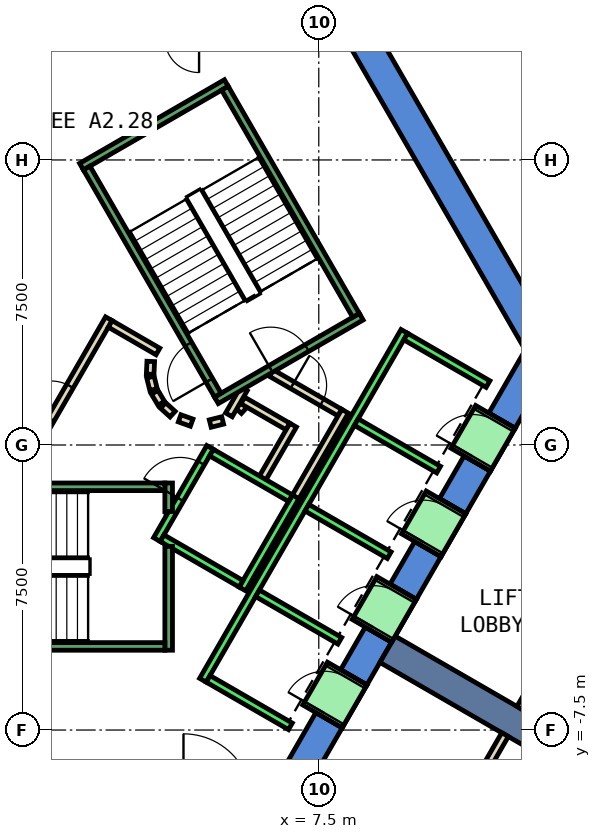
"""IFC4 building model, lengths in metres.
Left out: names, types, materials, properties, quantities, classifications, styles, units other than length and angle.
Written with IfcOpenShell. Run it as: python <this file> out.ifc"""

import sys

from ifc_helpers import new_model, si_unit, direction, frame, frame_2d, origin, place, context, subcontext, project, spatial, polyline, rectangle, outline, extrude, element, fill, save


model = new_model("IFC4")
c1 = context("Model", 3, precision=1e-05, world=origin(), true_north=direction((0.0, 1.0)))
c2 = subcontext(c1, "Body", "Model", "MODEL_VIEW")
j1 = project(units=[si_unit("LENGTHUNIT", "METRE"), si_unit("PLANEANGLEUNIT", "RADIAN")], contexts=[c1])
p1 = place(None, origin())
s1 = spatial("IfcSite", under=j1, at=p1, CompositionType="ELEMENT")
p2 = place(p1, origin())
s2 = spatial("IfcBuilding", under=s1, at=p2, CompositionType="ELEMENT")
p3 = place(p2, frame((0.0, 0.0, 138.2)))
s3 = spatial("IfcBuildingStorey", under=s2, at=p3, CompositionType="ELEMENT", Elevation=138.2)
p4 = place(p3, frame((0.0, 0.0, -0.6)))
e1 = element("IfcWall", 1, at=p4, inside=s3, PredefinedType="SHEAR", context=c2, shape_type="SweptSolid", body=[
    extrude(outline(polyline([(8.517, 11.748), (7.824, 11.348), (12.933, 2.5), (13.856, 2.5), (8.517, 11.748)])), origin(), (0.0, 0.0, 1.0), 4.4),
])
p5 = place(p3, frame((0.0, 0.0, -0.6)))
e2 = element("IfcWall", 2, at=p5, inside=s3, PredefinedType="SHEAR", context=c2, shape_type="SweptSolid", body=[
    extrude(outline(polyline([(8.117, -7.44), (7.424, -7.04), (6.466, -8.7), (6.928, -9.5), (8.117, -7.44)])), origin(), (0.0, 0.0, 1.0), 4.4),
])
p6 = place(p3, frame((0.0, 0.0, -0.6)))
e3 = element("IfcWall", 3, at=p6, inside=s3, PredefinedType="SHEAR", context=c2, shape_type="SweptSolid", body=[
    extrude(outline(polyline([(9.417, -5.189), (8.724, -4.789), (8.075, -5.914), (8.767, -6.314), (9.417, -5.189)])), origin(), (0.0, 0.0, 1.0), 4.4),
])
p7 = place(p3, frame((0.0, 0.0, -0.6)))
e4 = element("IfcWall", 4, at=p7, inside=s3, PredefinedType="SHEAR", context=c2, shape_type="SweptSolid", body=[
    extrude(outline(polyline([(10.717, -2.937), (10.025, -2.537), (9.374, -3.663), (10.067, -4.063), (10.717, -2.937)])), origin(), (0.0, 0.0, 1.0), 4.4),
])
p8 = place(p3, frame((0.0, 0.0, -0.6)))
e5 = element("IfcWall", 5, at=p8, inside=s3, PredefinedType="SHEAR", context=c2, shape_type="SweptSolid", body=[
    extrude(outline(polyline([(12.017, -0.686), (11.324, -0.286), (10.675, -1.411), (11.367, -1.811), (12.017, -0.686)])), origin(), (0.0, 0.0, 1.0), 4.4),
])
p9 = place(p3, frame((0.0, 0.0, -0.6)))
e6 = element("IfcWall", 6, at=p9, inside=s3, PredefinedType="SHEAR", context=c2, shape_type="SweptSolid", body=[
    extrude(outline(polyline([(11.974, 0.84), (12.667, 0.44), (13.856, 2.5), (12.933, 2.5), (11.974, 0.84)])), origin(), (0.0, 0.0, 1.0), 4.4),
])
p10 = place(p3, frame((0.0, 0.0, 3.6)))
e7 = element("IfcWall", 7, at=p10, inside=s3, PredefinedType="SHEAR", context=c2, shape_type="SweptSolid", body=[
    extrude(outline(polyline([(8.767, -6.314), (8.075, -5.914), (7.424, -7.04), (8.117, -7.44), (8.767, -6.314)])), origin(), (0.0, 0.0, 1.0), 0.2),
])
p11 = place(p3, frame((0.0, 0.0, 3.6)))
e8 = element("IfcWall", 8, at=p11, inside=s3, PredefinedType="SHEAR", context=c2, shape_type="SweptSolid", body=[
    extrude(outline(polyline([(10.067, -4.063), (9.374, -3.663), (8.724, -4.789), (9.417, -5.189), (10.067, -4.063)])), origin(), (0.0, 0.0, 1.0), 0.2),
])
p12 = place(p3, frame((0.0, 0.0, 3.6)))
e9 = element("IfcWall", 9, at=p12, inside=s3, PredefinedType="SHEAR", context=c2, shape_type="SweptSolid", body=[
    extrude(outline(polyline([(11.367, -1.811), (10.675, -1.411), (10.025, -2.537), (10.717, -2.937), (11.367, -1.811)])), origin(), (0.0, 0.0, 1.0), 0.2),
])
p13 = place(p3, frame((0.0, 0.0, 3.6)))
e10 = element("IfcWall", 10, at=p13, inside=s3, PredefinedType="SHEAR", context=c2, shape_type="SweptSolid", body=[
    extrude(outline(polyline([(12.667, 0.44), (11.974, 0.84), (11.324, -0.286), (12.017, -0.686), (12.667, 0.44)])), origin(), (0.0, 0.0, 1.0), 0.2),
])
p14 = place(p3, frame((9.31, -5.375, -0.6), z_axis=(0.0, 0.0, 1.0), x_axis=(0.866017533419, -0.500013631625, 0.0)))
e11 = element("IfcWall", 11, at=p14, inside=s3, PredefinedType="SHEAR", context=c2, shape_type="SweptSolid", body=[
    extrude(rectangle(XDim=9.0, YDim=0.8, at=frame_2d((4.5, 0.0))), origin(), (0.0, 0.0, 1.0), 4.4),
])
p15 = place(p3, frame((5.39, 0.898, 0.0), z_axis=(0.0, 0.0, 1.0), x_axis=(0.673828488714, 0.738887791073, 0.0)))
e12 = element("IfcWall", 12, at=p15, inside=s3, PredefinedType="PARTITIONING", context=c2, shape_type="SweptSolid", body=[
    extrude(rectangle(XDim=0.263, YDim=0.2, at=frame_2d((0.131, 0.0))), origin(), (0.0, 0.0, 1.0), 3.8),
])
p16 = place(p3, frame((5.499, 1.172, 0.0), z_axis=(0.0, 0.0, 1.0), x_axis=(0.866333505267, -0.499465972466, 0.0)))
e13 = element("IfcWall", 13, at=p16, inside=s3, PredefinedType="PARTITIONING", context=c2, shape_type="SweptSolid", body=[
    extrude(rectangle(XDim=1.374, YDim=0.2, at=frame_2d((0.687, 0.0))), origin(), (0.0, 0.0, 1.0), 3.8),
])
p17 = place(p3, frame((6.826, 0.522, 0.0), z_axis=(0.0, 0.0, 1.0), x_axis=(-0.500016722714, -0.866015748706, 0.0)))
e14 = element("IfcWall", 14, at=p17, inside=s3, PredefinedType="PARTITIONING", context=c2, shape_type="SweptSolid", body=[
    extrude(rectangle(XDim=1.7, YDim=0.2, at=frame_2d((0.85, 0.0))), origin(), (0.0, 0.0, 1.0), 3.8),
])
p18 = place(p3, frame((6.25, 1.894, 0.0), z_axis=(0.0, 0.0, 1.0), x_axis=(0.866043184279, -0.499969202016, 0.0)))
e15 = element("IfcWall", 15, at=p18, inside=s3, PredefinedType="PARTITIONING", context=c2, shape_type="SweptSolid", body=[
    extrude(rectangle(XDim=2.084, YDim=0.2, at=frame_2d((1.042, 0.0))), origin(), (0.0, 0.0, 1.0), 3.8),
])
p19 = place(p18, frame((0.642, 0.0, 0.0)))
e16 = element("IfcOpeningElement", 16, at=p19, cuts=e15, PredefinedType="OPENING", context=c2, shape_type="SweptSolid", body=[
    extrude(rectangle(XDim=0.9, YDim=2.1, at=frame_2d((0.45, 1.05))), frame((0.0, 0.11, 0.0), z_axis=(0.0, -1.0, 0.0), x_axis=(1.0, 0.0, 0.0)), (0.0, 0.0, 1.0), 0.22),
])
p20 = place(p3, frame((8.192, 0.888, 0.0), z_axis=(0.0, 0.0, 1.0), x_axis=(-0.499940625693, -0.866059680843, 0.0)))
e17 = element("IfcWall", 17, at=p20, inside=s3, PredefinedType="PARTITIONING", context=c2, shape_type="SweptSolid", body=[
    extrude(rectangle(XDim=2.68, YDim=0.2, at=frame_2d((1.34, 0.0))), origin(), (0.0, 0.0, 1.0), 3.8),
])
p21 = place(p3, frame((5.135, 0.793, 0.0), z_axis=(0.0, 0.0, 1.0), x_axis=(0.499526442893, 0.866298639529, 0.0)))
e18 = element("IfcWall", 18, at=p21, inside=s3, PredefinedType="PARTITIONING", context=c2, shape_type="SweptSolid", body=[
    extrude(rectangle(XDim=0.791, YDim=0.2, at=frame_2d((0.396, 0.0))), origin(), (0.0, 0.0, 1.0), 3.8),
])
p22 = place(p3, frame((-0.52, -1.0, 0.0), z_axis=(0.0, 0.0, 1.0), x_axis=(0.50011622646, 0.865958290007, 0.0)))
e19 = element("IfcWall", 19, at=p22, inside=s3, PredefinedType="PARTITIONING", context=c2, shape_type="SweptSolid", body=[
    extrude(rectangle(XDim=4.991, YDim=0.2, at=frame_2d((2.496, 0.0))), origin(), (0.0, 0.0, 1.0), 3.8),
])
p23 = place(p22, frame((1.945, 0.0, 0.0)))
e20 = element("IfcOpeningElement", 20, at=p23, cuts=e19, PredefinedType="OPENING", context=c2, shape_type="SweptSolid", body=[
    extrude(rectangle(XDim=1.0, YDim=2.1, at=frame_2d((0.5, 1.05))), frame((0.0, 0.11, 0.0), z_axis=(0.0, -1.0, 0.0), x_axis=(1.0, 0.0, 0.0)), (0.0, 0.0, 1.0), 0.22),
])
p24 = place(p3, frame((2.012, 3.186, 0.0), z_axis=(0.0, 0.0, 1.0), x_axis=(0.865891012941, -0.500232699559, 0.0)))
e21 = element("IfcWall", 21, at=p24, inside=s3, PredefinedType="PARTITIONING", context=c2, shape_type="SweptSolid", body=[
    extrude(rectangle(XDim=1.449, YDim=0.2, at=frame_2d((0.725, 0.0))), origin(), (0.0, 0.0, 1.0), 3.8),
])
p25 = place(p3, frame((3.079, 2.199, 0.0), z_axis=(0.0, 0.0, 1.0), x_axis=(-0.047771483479, -0.998858290933, 0.0)))
e22 = element("IfcWall", 22, at=p25, inside=s3, PredefinedType="PARTITIONING", context=c2, shape_type="SweptSolid", body=[
    extrude(rectangle(XDim=0.337, YDim=0.2, at=frame_2d((0.169, 0.0))), origin(), (0.0, 0.0, 1.0), 3.8),
])
p26 = place(p3, frame((3.07, 1.786, 0.0), z_axis=(0.0, 0.0, 1.0), x_axis=(0.242705583207, -0.970099994784, 0.0)))
e23 = element("IfcWall", 23, at=p26, inside=s3, PredefinedType="PARTITIONING", context=c2, shape_type="SweptSolid", body=[
    extrude(rectangle(XDim=0.338, YDim=0.2, at=frame_2d((0.169, 0.0))), origin(), (0.0, 0.0, 1.0), 3.8),
])
for number, where, z_axis, x_axis in (
    (24, (3.182, 1.388, 0.0), (0.0, 0.0, 1.0), (0.512, -0.859, 0.0)),
    (25, (3.404, 1.039, 0.0), (0.0, 0.0, 1.0), (0.74, -0.672, 0.0)),
):
    element("IfcWall", number, at=place(p3, frame(where, z_axis=z_axis, x_axis=x_axis)), inside=s3, PredefinedType="PARTITIONING", context=c2, shape_type="SweptSolid", body=[
        extrude(rectangle(XDim=0.338, YDim=0.2, at=frame_2d((0.169, 0.0))), origin(), (0.0, 0.0, 1.0), 3.8),
    ])
p27 = place(p3, frame((3.838, 0.702, 0.0), z_axis=(0.0, 0.0, 1.0), x_axis=(0.941035081519, -0.338308993895, 0.0)))
e26 = element("IfcWall", 26, at=p27, inside=s3, PredefinedType="PARTITIONING", context=c2, shape_type="SweptSolid", body=[
    extrude(rectangle(XDim=0.337, YDim=0.2, at=frame_2d((0.168, 0.0))), origin(), (0.0, 0.0, 1.0), 3.8),
])
p28 = place(p3, frame((4.644, 0.564, 0.0), z_axis=(0.0, 0.0, 1.0), x_axis=(0.969929076366, 0.243387729394, 0.0)))
e27 = element("IfcWall", 27, at=p28, inside=s3, PredefinedType="PARTITIONING", context=c2, shape_type="SweptSolid", body=[
    extrude(rectangle(XDim=0.337, YDim=0.2, at=frame_2d((0.168, 0.0))), origin(), (0.0, 0.0, 1.0), 3.8),
])
p29 = place(p3, frame((13.535, -5.657, 0.0), z_axis=(0.0, 0.0, 1.0), x_axis=(-0.499751238113, -0.866168978898, 0.0)))
e28 = element("IfcWall", 28, at=p29, inside=s3, PredefinedType="PARTITIONING", context=c2, shape_type="SweptSolid", body=[
    extrude(rectangle(XDim=1.469, YDim=0.2, at=frame_2d((0.734, 0.0))), origin(), (0.0, 0.0, 1.0), 3.8),
])
p30 = place(p3, frame((12.401, -7.621, 0.0), z_axis=(0.0, 0.0, 1.0), x_axis=(-0.499964151829, -0.866046099747, 0.0)))
e29 = element("IfcWall", 29, at=p30, inside=s3, PredefinedType="PARTITIONING", context=c2, shape_type="SweptSolid", body=[
    extrude(rectangle(XDim=8.656, YDim=0.2, at=frame_2d((4.328, 0.0))), origin(), (0.0, 0.0, 1.0), 3.8),
])
p31 = place(p30, frame((2.694, 0.0, 0.0)))
e30 = element("IfcOpeningElement", 30, at=p31, cuts=e29, PredefinedType="OPENING", context=c2, shape_type="SweptSolid", body=[
    extrude(rectangle(XDim=1.0, YDim=2.1, at=frame_2d((0.5, 1.05))), frame((0.0, 0.11, 0.0), z_axis=(0.0, -1.0, 0.0), x_axis=(1.0, 0.0, 0.0)), (0.0, 0.0, 1.0), 0.22),
])
p32 = place(p30, frame((3.794, 0.0, 0.0)))
e31 = element("IfcOpeningElement", 31, at=p32, cuts=e29, PredefinedType="OPENING", context=c2, shape_type="SweptSolid", body=[
    extrude(rectangle(XDim=1.0, YDim=2.1, at=frame_2d((0.5, 1.05))), frame((0.0, 0.11, 0.0), z_axis=(0.0, -1.0, 0.0), x_axis=(1.0, 0.0, 0.0)), (0.0, 0.0, 1.0), 0.22),
])
p33 = place(p3, frame((3.24, -2.488, 0.0), z_axis=(0.0, 0.0, 1.0), x_axis=(0.49994636267, 0.866056369097, 0.0)))
e32 = element("IfcWall", 32, at=p33, inside=s3, PredefinedType="STANDARD", context=c2, shape_type="SweptSolid", body=[
    extrude(rectangle(XDim=2.8, YDim=0.2, at=frame_2d((1.4, 0.0))), origin(), (0.0, 0.0, 1.0), 3.8),
])
p34 = place(p33, frame((1.225, 0.0, 0.0)))
e33 = element("IfcOpeningElement", 33, at=p34, cuts=e32, PredefinedType="OPENING", context=c2, shape_type="SweptSolid", body=[
    extrude(rectangle(XDim=1.1, YDim=2.1, at=frame_2d((0.55, 1.05))), frame((0.0, 0.11, 0.0), z_axis=(0.0, -1.0, 0.0), x_axis=(1.0, 0.0, 0.0)), (0.0, 0.0, 1.0), 0.22),
])
p35 = place(p3, frame((5.492, -3.788, 0.0), z_axis=(0.0, 0.0, 1.0), x_axis=(0.500011755427, 0.866018616679, 0.0)))
e34 = element("IfcWall", 34, at=p35, inside=s3, PredefinedType="STANDARD", context=c2, shape_type="SweptSolid", body=[
    extrude(rectangle(XDim=2.8, YDim=0.2, at=frame_2d((1.4, 0.0))), origin(), (0.0, 0.0, 1.0), 3.8),
])
p36 = place(p3, frame((3.377, -2.452, 0.0), z_axis=(0.0, 0.0, 1.0), x_axis=(0.865955154139, -0.50012165622, 0.0)))
e35 = element("IfcWall", 35, at=p36, inside=s3, PredefinedType="STANDARD", context=c2, shape_type="SweptSolid", body=[
    extrude(rectangle(XDim=2.4, YDim=0.2, at=frame_2d((1.2, 0.0))), origin(), (0.0, 0.0, 1.0), 3.8),
])
p37 = place(p3, frame((4.677, -0.2, 0.0), z_axis=(0.0, 0.0, 1.0), x_axis=(0.865973769406, -0.500089422704, 0.0)))
e36 = element("IfcWall", 36, at=p37, inside=s3, PredefinedType="STANDARD", context=c2, shape_type="SweptSolid", body=[
    extrude(rectangle(XDim=2.399, YDim=0.2, at=frame_2d((1.2, 0.0))), origin(), (0.0, 0.0, 1.0), 3.8),
])
p38 = place(p3, frame((4.451, -6.19, 0.0), z_axis=(0.0, 0.0, 1.0), x_axis=(0.50000090737, 0.866024879913, 0.0)))
e37 = element("IfcWall", 37, at=p38, inside=s3, PredefinedType="STANDARD", context=c2, shape_type="SweptSolid", body=[
    extrude(rectangle(XDim=10.6, YDim=0.2, at=frame_2d((5.3, 0.0))), origin(), (0.0, 0.0, 1.0), 3.8),
])
for number, where, z_axis, x_axis in (
    (38, (4.588, -6.153, 0.0), (0.0, 0.0, 1.0), (0.866, -0.5, 0.0)),
    (39, (5.888, -3.902, 0.0), (0.0, 0.0, 1.0), (0.866, -0.5, 0.0)),
    (40, (7.188, -1.65, 0.0), (0.0, 0.0, 1.0), (0.866, -0.5, 0.0)),
    (41, (8.488, 0.602, 0.0), (0.0, 0.0, 1.0), (0.866, -0.5, 0.0)),
):
    element("IfcWall", number, at=place(p3, frame(where, z_axis=z_axis, x_axis=x_axis)), inside=s3, PredefinedType="STANDARD", context=c2, shape_type="SweptSolid", body=[
        extrude(rectangle(XDim=2.5, YDim=0.2, at=frame_2d((1.25, 0.0))), origin(), (0.0, 0.0, 1.0), 3.8),
    ])
p39 = place(p3, frame((9.788, 2.853, 0.0), z_axis=(0.0, 0.0, 1.0), x_axis=(0.865998541277, -0.500046524342, 0.0)))
e42 = element("IfcWall", 42, at=p39, inside=s3, PredefinedType="STANDARD", context=c2, shape_type="SweptSolid", body=[
    extrude(rectangle(XDim=2.5, YDim=0.2, at=frame_2d((1.25, 0.0))), origin(), (0.0, 0.0, 1.0), 3.8),
])
p40 = place(p3, frame((7.598, -7.14, 0.0), z_axis=(0.0, 0.0, 1.0), x_axis=(0.500362116554, 0.865816234728, 0.0)))
e43 = element("IfcWall", 43, at=p40, inside=s3, PredefinedType="STANDARD", context=c2, shape_type="SweptSolid", body=[
    extrude(rectangle(XDim=1.299, YDim=1.2, at=frame_2d((0.65, 0.0))), origin(), (0.0, 0.0, 1.0), 2.4),
])
p41 = place(p40, frame((0.1, 0.0, 0.0)))
e44 = element("IfcOpeningElement", 44, at=p41, cuts=e43, PredefinedType="OPENING", context=c2, shape_type="SweptSolid", body=[
    extrude(rectangle(XDim=1.1, YDim=2.3, at=frame_2d((0.55, 1.15))), frame((0.0, 0.61, 0.0), z_axis=(0.0, -1.0, 0.0), x_axis=(1.0, 0.0, 0.0)), (0.0, 0.0, 1.0), 1.22),
])
p42 = place(p3, frame((8.898, -4.889, 0.0), z_axis=(0.0, 0.0, 1.0), x_axis=(0.500036693733, 0.866004217611, 0.0)))
e45 = element("IfcWall", 45, at=p42, inside=s3, PredefinedType="STANDARD", context=c2, shape_type="SweptSolid", body=[
    extrude(rectangle(XDim=1.3, YDim=1.2, at=frame_2d((0.65, 0.0))), origin(), (0.0, 0.0, 1.0), 2.4),
])
p43 = place(p42, frame((0.1, 0.0, 0.0)))
e46 = element("IfcOpeningElement", 46, at=p43, cuts=e45, PredefinedType="OPENING", context=c2, shape_type="SweptSolid", body=[
    extrude(rectangle(XDim=1.1, YDim=2.3, at=frame_2d((0.55, 1.15))), frame((0.0, 0.61, 0.0), z_axis=(0.0, -1.0, 0.0), x_axis=(1.0, 0.0, 0.0)), (0.0, 0.0, 1.0), 1.22),
])
p44 = place(p3, frame((10.198, -2.637, 0.0), z_axis=(0.0, 0.0, 1.0), x_axis=(0.49989585183, 0.866085525409, 0.0)))
e47 = element("IfcWall", 47, at=p44, inside=s3, PredefinedType="STANDARD", context=c2, shape_type="SweptSolid", body=[
    extrude(rectangle(XDim=1.3, YDim=1.2, at=frame_2d((0.65, 0.0))), origin(), (0.0, 0.0, 1.0), 2.4),
])
p45 = place(p44, frame((0.1, 0.0, 0.0)))
e48 = element("IfcOpeningElement", 48, at=p45, cuts=e47, PredefinedType="OPENING", context=c2, shape_type="SweptSolid", body=[
    extrude(rectangle(XDim=1.1, YDim=2.3, at=frame_2d((0.55, 1.15))), frame((0.0, 0.61, 0.0), z_axis=(0.0, -1.0, 0.0), x_axis=(1.0, 0.0, 0.0)), (0.0, 0.0, 1.0), 1.22),
])
p46 = place(p3, frame((11.498, -0.385, 0.0), z_axis=(0.0, 0.0, 1.0), x_axis=(0.500221244143, 0.865897630733, 0.0)))
e49 = element("IfcWall", 49, at=p46, inside=s3, PredefinedType="STANDARD", context=c2, shape_type="SweptSolid", body=[
    extrude(rectangle(XDim=1.299, YDim=1.2, at=frame_2d((0.65, 0.0))), origin(), (0.0, 0.0, 1.0), 2.4),
])
p47 = place(p46, frame((0.1, 0.0, 0.0)))
e50 = element("IfcOpeningElement", 50, at=p47, cuts=e49, PredefinedType="OPENING", context=c2, shape_type="SweptSolid", body=[
    extrude(rectangle(XDim=1.1, YDim=2.3, at=frame_2d((0.55, 1.15))), frame((0.0, 0.61, 0.0), z_axis=(0.0, -1.0, 0.0), x_axis=(1.0, 0.0, 0.0)), (0.0, 0.0, 1.0), 1.22),
])
p48 = place(p3, frame((3.55, -2.667, 0.0), z_axis=(0.0, 0.0, 1.0), x_axis=(0.0, -1.0, 0.0)))
e51 = element("IfcWall", 51, at=p48, inside=s3, PredefinedType="STANDARD", context=c2, shape_type="SweptSolid", body=[
    extrude(rectangle(XDim=2.733, YDim=0.2, at=frame_2d((1.366, 0.0))), origin(), (0.0, 0.0, 1.0), 3.8),
])
p49 = place(p3, frame((3.55, -1.0, 0.0), z_axis=(0.0, 0.0, 1.0), x_axis=(0.0, -1.0, 0.0)))
e52 = element("IfcWall", 52, at=p49, inside=s3, PredefinedType="STANDARD", context=c2, shape_type="SweptSolid", body=[
    extrude(rectangle(XDim=0.751, YDim=0.2, at=frame_2d((0.375, 0.0))), origin(), (0.0, 0.0, 1.0), 3.8),
])
p50 = place(p3, frame((-3.45, -1.1, 0.0), z_axis=(0.0, 0.0, 1.0), x_axis=(1.0, 0.0, 0.0)))
e53 = element("IfcWall", 53, at=p50, inside=s3, PredefinedType="STANDARD", context=c2, shape_type="SweptSolid", body=[
    extrude(rectangle(XDim=6.9, YDim=0.2, at=frame_2d((3.45, 0.0))), origin(), (0.0, 0.0, 1.0), 3.8),
])
p51 = place(p50, frame((0.45, 0.0, 0.0)))
e54 = element("IfcOpeningElement", 54, at=p51, cuts=e53, PredefinedType="OPENING", context=c2, shape_type="SweptSolid", body=[
    extrude(rectangle(XDim=1.1, YDim=2.2, at=frame_2d((0.55, 1.1))), frame((0.0, 0.11, 0.0), z_axis=(0.0, -1.0, 0.0), x_axis=(1.0, 0.0, 0.0)), (0.0, 0.0, 1.0), 0.22),
])
p52 = place(p3, frame((-3.45, -5.3, 0.0), z_axis=(0.0, 0.0, 1.0), x_axis=(1.0, 0.0, 0.0)))
e55 = element("IfcWall", 55, at=p52, inside=s3, PredefinedType="STANDARD", context=c2, shape_type="SweptSolid", body=[
    extrude(rectangle(XDim=6.9, YDim=0.2, at=frame_2d((3.45, 0.0))), origin(), (0.0, 0.0, 1.0), 3.8),
])
p53 = place(p3, frame((4.806, 1.176, 0.0), z_axis=(0.0, 0.0, 1.0), x_axis=(0.866059941101, 0.499940174841, 0.0)))
e56 = element("IfcWall", 56, at=p53, inside=s3, PredefinedType="STANDARD", context=c2, shape_type="SweptSolid", body=[
    extrude(rectangle(XDim=4.4, YDim=0.2, at=frame_2d((2.2, 0.0))), origin(), (0.0, 0.0, 1.0), 3.8),
])
p54 = place(p53, frame((1.65, 0.0, 0.0)))
e57 = element("IfcOpeningElement", 57, at=p54, cuts=e56, PredefinedType="OPENING", context=c2, shape_type="SweptSolid", body=[
    extrude(rectangle(XDim=1.1, YDim=2.2, at=frame_2d((0.55, 1.1))), frame((0.0, 0.11, 0.0), z_axis=(0.0, -1.0, 0.0), x_axis=(1.0, 0.0, 0.0)), (0.0, 0.0, 1.0), 0.22),
])
p55 = place(p3, frame((1.256, 7.324, 0.0), z_axis=(0.0, 0.0, 1.0), x_axis=(0.866046073146, 0.499964197906, 0.0)))
e58 = element("IfcWall", 58, at=p55, inside=s3, PredefinedType="STANDARD", context=c2, shape_type="SweptSolid", body=[
    extrude(rectangle(XDim=4.4, YDim=0.2, at=frame_2d((2.2, 0.0))), origin(), (0.0, 0.0, 1.0), 3.8),
])
p56 = place(p3, frame((4.843, 1.312, 0.0), z_axis=(0.0, 0.0, 1.0), x_axis=(-0.499963383562, 0.866046543262, 0.0)))
e59 = element("IfcWall", 59, at=p56, inside=s3, PredefinedType="STANDARD", context=c2, shape_type="SweptSolid", body=[
    extrude(rectangle(XDim=6.9, YDim=0.2, at=frame_2d((3.45, 0.0))), origin(), (0.0, 0.0, 1.0), 3.8),
])
p57 = place(p56, frame((0.45, 0.0, 0.0)))
e60 = element("IfcOpeningElement", 60, at=p57, cuts=e59, PredefinedType="OPENING", context=c2, shape_type="SweptSolid", body=[
    extrude(rectangle(XDim=1.1, YDim=2.2, at=frame_2d((0.55, 1.1))), frame((0.0, 0.11, 0.0), z_axis=(0.0, -1.0, 0.0), x_axis=(1.0, 0.0, 0.0)), (0.0, 0.0, 1.0), 0.22),
])
p58 = place(p3, frame((8.48, 3.412, 0.0), z_axis=(0.0, 0.0, 1.0), x_axis=(-0.499978703459, 0.866037698999, 0.0)))
e61 = element("IfcWall", 61, at=p58, inside=s3, PredefinedType="STANDARD", context=c2, shape_type="SweptSolid", body=[
    extrude(rectangle(XDim=6.9, YDim=0.2, at=frame_2d((3.45, 0.0))), origin(), (0.0, 0.0, 1.0), 3.8),
])
p59 = place(p23, origin())
e62 = element("IfcDoor", 62, at=p59, inside=s3, OperationType="SINGLE_SWING_LEFT", PredefinedType="DOOR", context=c2, shape_type="SweptSolid", body=[
    extrude(rectangle(XDim=1.0, YDim=2.1, at=frame_2d((0.5, 1.05))), frame((0.0, 0.025, 0.0), z_axis=(0.0, -1.0, 0.0), x_axis=(1.0, 0.0, 0.0)), (0.0, 0.0, 1.0), 0.05),
])
fill(e20, e62)
p60 = place(p19, origin())
e63 = element("IfcDoor", 63, at=p60, inside=s3, OperationType="SINGLE_SWING_LEFT", PredefinedType="DOOR", context=c2, shape_type="SweptSolid", body=[
    extrude(rectangle(XDim=0.9, YDim=2.1, at=frame_2d((0.45, 1.05))), frame((0.0, 0.025, 0.0), z_axis=(0.0, -1.0, 0.0), x_axis=(1.0, 0.0, 0.0)), (0.0, 0.0, 1.0), 0.05),
])
fill(e16, e63)
p61 = place(p41, origin())
e64 = element("IfcDoor", 64, at=p61, inside=s3, OperationType="SLIDING_TO_LEFT", PredefinedType="DOOR", context=c2, shape_type="SweptSolid", body=[
    extrude(rectangle(XDim=1.1, YDim=2.3, at=frame_2d((0.55, 1.15))), frame((0.0, 0.025, 0.0), z_axis=(0.0, -1.0, 0.0), x_axis=(1.0, 0.0, 0.0)), (0.0, 0.0, 1.0), 0.05),
])
fill(e44, e64)
p62 = place(p43, origin())
e65 = element("IfcDoor", 65, at=p62, inside=s3, OperationType="SLIDING_TO_LEFT", PredefinedType="DOOR", context=c2, shape_type="SweptSolid", body=[
    extrude(rectangle(XDim=1.1, YDim=2.3, at=frame_2d((0.55, 1.15))), frame((0.0, 0.025, 0.0), z_axis=(0.0, -1.0, 0.0), x_axis=(1.0, 0.0, 0.0)), (0.0, 0.0, 1.0), 0.05),
])
fill(e46, e65)
p63 = place(p45, origin())
e66 = element("IfcDoor", 66, at=p63, inside=s3, OperationType="SLIDING_TO_LEFT", PredefinedType="DOOR", context=c2, shape_type="SweptSolid", body=[
    extrude(rectangle(XDim=1.1, YDim=2.3, at=frame_2d((0.55, 1.15))), frame((0.0, 0.025, 0.0), z_axis=(0.0, -1.0, 0.0), x_axis=(1.0, 0.0, 0.0)), (0.0, 0.0, 1.0), 0.05),
])
fill(e48, e66)
p64 = place(p47, origin())
e67 = element("IfcDoor", 67, at=p64, inside=s3, OperationType="SLIDING_TO_LEFT", PredefinedType="DOOR", context=c2, shape_type="SweptSolid", body=[
    extrude(rectangle(XDim=1.1, YDim=2.3, at=frame_2d((0.55, 1.15))), frame((0.0, 0.025, 0.0), z_axis=(0.0, -1.0, 0.0), x_axis=(1.0, 0.0, 0.0)), (0.0, 0.0, 1.0), 0.05),
])
fill(e50, e67)
p65 = place(p34, origin())
e68 = element("IfcDoor", 68, at=p65, inside=s3, OperationType="SLIDING_TO_LEFT", PredefinedType="DOOR", context=c2, shape_type="SweptSolid", body=[
    extrude(rectangle(XDim=1.1, YDim=2.1, at=frame_2d((0.55, 1.05))), frame((0.0, 0.025, 0.0), z_axis=(0.0, -1.0, 0.0), x_axis=(1.0, 0.0, 0.0)), (0.0, 0.0, 1.0), 0.05),
])
fill(e33, e68)
p66 = place(p57, origin())
e69 = element("IfcDoor", 69, at=p66, inside=s3, OperationType="SINGLE_SWING_LEFT", PredefinedType="DOOR", context=c2, shape_type="SweptSolid", body=[
    extrude(rectangle(XDim=1.1, YDim=2.2, at=frame_2d((0.55, 1.1))), frame((0.0, 0.025, 0.0), z_axis=(0.0, -1.0, 0.0), x_axis=(1.0, 0.0, 0.0)), (0.0, 0.0, 1.0), 0.05),
])
fill(e60, e69)
p67 = place(p54, origin())
e70 = element("IfcDoor", 70, at=p67, inside=s3, OperationType="SINGLE_SWING_LEFT", PredefinedType="DOOR", context=c2, shape_type="SweptSolid", body=[
    extrude(rectangle(XDim=1.1, YDim=2.2, at=frame_2d((0.55, 1.1))), frame((0.0, 0.025, 0.0), z_axis=(0.0, -1.0, 0.0), x_axis=(1.0, 0.0, 0.0)), (0.0, 0.0, 1.0), 0.05),
])
fill(e57, e70)
save(model, sys.argv[1])
